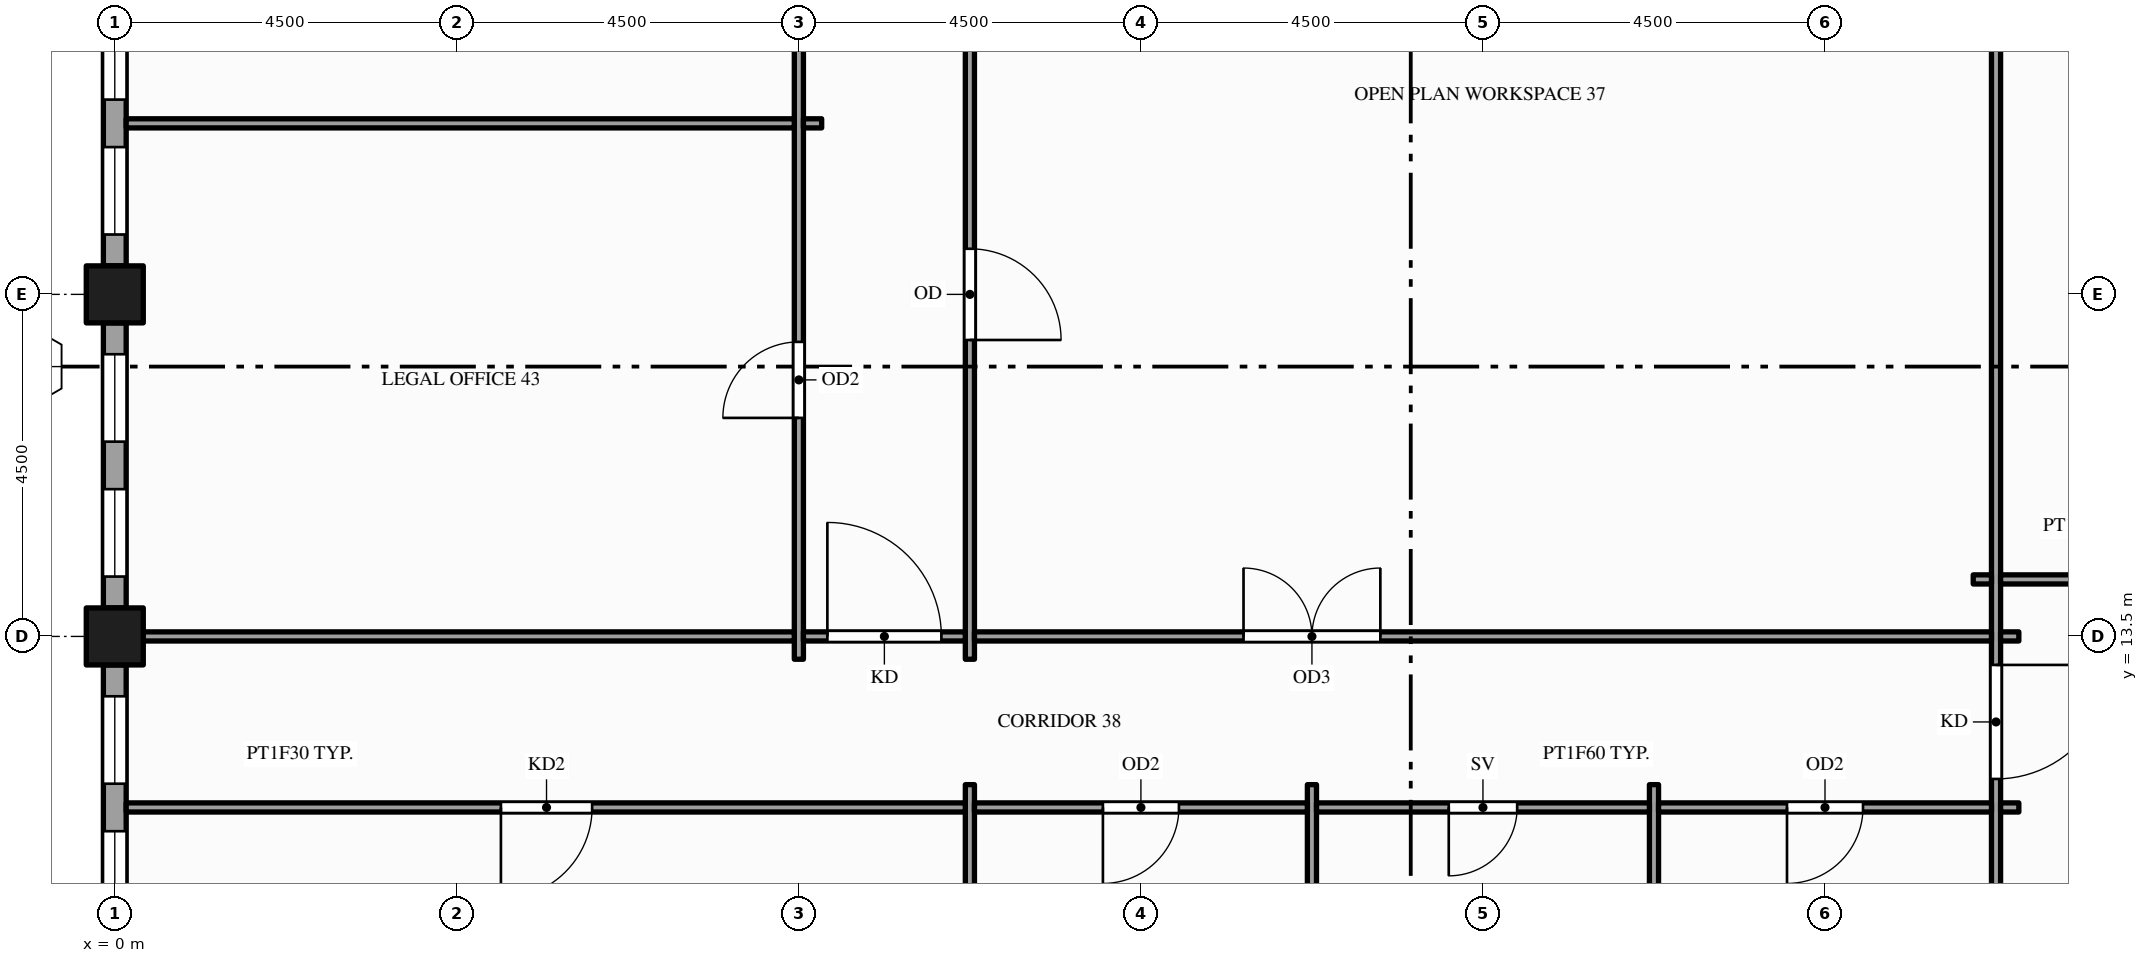
"""IFC4 building model, lengths in metres.
Left out: names, types, materials, properties, quantities, classifications, styles, units other than length and angle.
Written with IfcOpenShell. Run it as: python <this file> out.ifc"""

import sys

from ifc_helpers import new_model, si_unit, direction, frame, frame_2d, origin, origin_2d, place, context, subcontext, project, spatial, rectangle, hollow_rectangle, extrude, element, fill, save


model = new_model("IFC4")
c1 = context("Model", 3, precision=1e-05, world=origin(), true_north=direction((0.0, 1.0)))
c2 = subcontext(c1, "Body", "Model", "MODEL_VIEW")
j1 = project(units=[si_unit("LENGTHUNIT", "METRE"), si_unit("PLANEANGLEUNIT", "RADIAN")], contexts=[c1])
p1 = place(None, origin())
s1 = spatial("IfcSite", under=j1, at=p1, CompositionType="ELEMENT")
p2 = place(p1, origin())
s2 = spatial("IfcBuilding", under=s1, at=p2, CompositionType="ELEMENT")
p3 = place(p2, frame((0.0, 0.0, 235.0)))
s3 = spatial("IfcBuildingStorey", under=s2, at=p3, CompositionType="ELEMENT", Elevation=235.0)
for number, where, z_axis, x_axis in (
    (1, (0.0, 13.5, -0.15), (0.0, 0.0, 1.0), (1.0, 0.0, 0.0)),
    (2, (0.0, 18.0, -0.15), (0.0, 0.0, 1.0), (1.0, 0.0, 0.0)),
):
    element("IfcColumn", number, at=place(p3, frame(where, z_axis=z_axis, x_axis=x_axis)), inside=s3, PredefinedType="COLUMN", context=c2, shape_type="SweptSolid", body=[
        extrude(hollow_rectangle(XDim=0.75, YDim=0.75, WallThickness=0.036, at=origin_2d()), origin(), (0.0, 0.0, 1.0), 4.0),
    ])
p4 = place(p3, frame((0.0, 22.125, 0.0), z_axis=(0.0, 0.0, 1.0), x_axis=(0.0, -1.0, 0.0)))
e3 = element("IfcWall", 3, at=p4, inside=s3, PredefinedType="STANDARD", context=c2, shape_type="SweptSolid", body=[
    extrude(rectangle(XDim=3.75, YDim=0.3, at=frame_2d((1.875, 0.0))), origin(), (0.0, 0.0, 1.0), 3.157),
])
p5 = place(p4, frame((0.413, 0.0, 0.9)))
e4 = element("IfcOpeningElement", 4, at=p5, cuts=e3, PredefinedType="OPENING", context=c2, shape_type="SweptSolid", body=[
    extrude(rectangle(XDim=1.15, YDim=2.0, at=frame_2d((0.575, 1.0))), frame((0.0, 0.16, 0.0), z_axis=(0.0, -1.0, 0.0), x_axis=(1.0, 0.0, 0.0)), (0.0, 0.0, 1.0), 0.32),
])
p6 = place(p4, frame((2.188, 0.0, 0.9)))
e5 = element("IfcOpeningElement", 5, at=p6, cuts=e3, PredefinedType="OPENING", context=c2, shape_type="SweptSolid", body=[
    extrude(rectangle(XDim=1.15, YDim=2.0, at=frame_2d((0.575, 1.0))), frame((0.0, 0.16, 0.0), z_axis=(0.0, -1.0, 0.0), x_axis=(1.0, 0.0, 0.0)), (0.0, 0.0, 1.0), 0.32),
])
p7 = place(p3, frame((0.0, 17.625, 0.0), z_axis=(0.0, 0.0, 1.0), x_axis=(0.0, -1.0, 0.0)))
e6 = element("IfcWall", 6, at=p7, inside=s3, PredefinedType="STANDARD", context=c2, shape_type="SweptSolid", body=[
    extrude(rectangle(XDim=3.75, YDim=0.3, at=frame_2d((1.875, 0.0))), origin(), (0.0, 0.0, 1.0), 3.157),
])
p8 = place(p7, frame((0.413, 0.0, 0.9)))
e7 = element("IfcOpeningElement", 7, at=p8, cuts=e6, PredefinedType="OPENING", context=c2, shape_type="SweptSolid", body=[
    extrude(rectangle(XDim=1.15, YDim=2.0, at=frame_2d((0.575, 1.0))), frame((0.0, 0.16, 0.0), z_axis=(0.0, -1.0, 0.0), x_axis=(1.0, 0.0, 0.0)), (0.0, 0.0, 1.0), 0.32),
])
p9 = place(p7, frame((2.188, 0.0, 0.9)))
e8 = element("IfcOpeningElement", 8, at=p9, cuts=e6, PredefinedType="OPENING", context=c2, shape_type="SweptSolid", body=[
    extrude(rectangle(XDim=1.15, YDim=2.0, at=frame_2d((0.575, 1.0))), frame((0.0, 0.16, 0.0), z_axis=(0.0, -1.0, 0.0), x_axis=(1.0, 0.0, 0.0)), (0.0, 0.0, 1.0), 0.32),
])
p10 = place(p3, frame((0.0, 13.125, 0.0), z_axis=(0.0, 0.0, 1.0), x_axis=(0.0, -1.0, 0.0)))
e9 = element("IfcWall", 9, at=p10, inside=s3, PredefinedType="STANDARD", context=c2, shape_type="SweptSolid", body=[
    extrude(rectangle(XDim=3.75, YDim=0.3, at=frame_2d((1.875, 0.0))), origin(), (0.0, 0.0, 1.0), 3.157),
])
p11 = place(p10, frame((0.413, 0.0, 0.9)))
e10 = element("IfcOpeningElement", 10, at=p11, cuts=e9, PredefinedType="OPENING", context=c2, shape_type="SweptSolid", body=[
    extrude(rectangle(XDim=1.15, YDim=2.0, at=frame_2d((0.575, 1.0))), frame((0.0, 0.16, 0.0), z_axis=(0.0, -1.0, 0.0), x_axis=(1.0, 0.0, 0.0)), (0.0, 0.0, 1.0), 0.32),
])
p12 = place(p10, frame((2.188, 0.0, 0.9)))
e11 = element("IfcOpeningElement", 11, at=p12, cuts=e9, PredefinedType="OPENING", context=c2, shape_type="SweptSolid", body=[
    extrude(rectangle(XDim=1.15, YDim=2.0, at=frame_2d((0.575, 1.0))), frame((0.0, 0.16, 0.0), z_axis=(0.0, -1.0, 0.0), x_axis=(1.0, 0.0, 0.0)), (0.0, 0.0, 1.0), 0.32),
])
p13 = place(p3, frame((9.0, 13.2, 0.0), z_axis=(0.0, 0.0, 1.0), x_axis=(0.0, 1.0, 0.0)))
e12 = element("IfcWall", 12, at=p13, inside=s3, PredefinedType="PARTITIONING", context=c2, shape_type="SweptSolid", body=[
    extrude(rectangle(XDim=18.6, YDim=0.12, at=frame_2d((9.3, 0.0))), origin(), (0.0, 0.0, 1.0), 2.6),
])
p14 = place(p13, frame((3.175, 0.0, 0.0)))
e13 = element("IfcOpeningElement", 13, at=p14, cuts=e12, PredefinedType="OPENING", context=c2, shape_type="SweptSolid", body=[
    extrude(rectangle(XDim=1.0, YDim=2.1, at=frame_2d((0.5, 1.05))), frame((0.0, 0.07, 0.0), z_axis=(0.0, -1.0, 0.0), x_axis=(1.0, 0.0, 0.0)), (0.0, 0.0, 1.0), 0.14),
])
p15 = place(p13, frame((9.955, 0.0, 0.0)))
e14 = element("IfcOpeningElement", 14, at=p15, cuts=e12, PredefinedType="OPENING", context=c2, shape_type="SweptSolid", body=[
    extrude(rectangle(XDim=1.0, YDim=2.1, at=frame_2d((0.5, 1.05))), frame((0.0, 0.07, 0.0), z_axis=(0.0, -1.0, 0.0), x_axis=(1.0, 0.0, 0.0)), (0.0, 0.0, 1.0), 0.14),
])
p16 = place(p3, frame((11.25, 0.15, 0.0), z_axis=(0.0, 0.0, 1.0), x_axis=(0.0, 1.0, 0.0)))
e15 = element("IfcWall", 15, at=p16, inside=s3, PredefinedType="PARTITIONING", context=c2, shape_type="SweptSolid", body=[
    extrude(rectangle(XDim=11.4, YDim=0.12, at=frame_2d((5.7, 0.0))), origin(), (0.0, 0.0, 1.0), 2.87),
])
p17 = place(p3, frame((11.25, 13.2, 0.0), z_axis=(0.0, 0.0, 1.0), x_axis=(0.0, 1.0, 0.0)))
e16 = element("IfcWall", 16, at=p17, inside=s3, PredefinedType="PARTITIONING", context=c2, shape_type="SweptSolid", body=[
    extrude(rectangle(XDim=18.6, YDim=0.12, at=frame_2d((9.3, 0.0))), origin(), (0.0, 0.0, 1.0), 2.6),
])
p18 = place(p17, frame((4.2, 0.0, 0.0)))
e17 = element("IfcOpeningElement", 17, at=p18, cuts=e16, PredefinedType="OPENING", context=c2, shape_type="SweptSolid", body=[
    extrude(rectangle(XDim=1.2, YDim=2.1, at=frame_2d((0.6, 1.05))), frame((0.0, 0.07, 0.0), z_axis=(0.0, -1.0, 0.0), x_axis=(1.0, 0.0, 0.0)), (0.0, 0.0, 1.0), 0.14),
])
for number, where, z_axis, x_axis in (
    (18, (15.75, 0.15, 0.0), (0.0, 0.0, 1.0), (0.0, 1.0, 0.0)),
    (19, (20.25, 0.15, 0.0), (0.0, 0.0, 1.0), (0.0, 1.0, 0.0)),
):
    element("IfcWall", number, at=place(p3, frame(where, z_axis=z_axis, x_axis=x_axis)), inside=s3, PredefinedType="PARTITIONING", context=c2, shape_type="SweptSolid", body=[
        extrude(rectangle(XDim=11.4, YDim=0.12, at=frame_2d((5.7, 0.0))), origin(), (0.0, 0.0, 1.0), 2.87),
    ])
p19 = place(p3, frame((24.75, -1.35, 0.0), z_axis=(0.0, 0.0, 1.0), x_axis=(0.0, 1.0, 0.0)))
e20 = element("IfcWall", 20, at=p19, inside=s3, PredefinedType="PARTITIONING", context=c2, shape_type="SweptSolid", body=[
    extrude(rectangle(XDim=24.101, YDim=0.12, at=frame_2d((12.05, 0.0))), origin(), (0.0, 0.0, 1.0), 2.76),
])
p20 = place(p19, frame((12.975, 0.0, 0.0)))
e21 = element("IfcOpeningElement", 21, at=p20, cuts=e20, PredefinedType="OPENING", context=c2, shape_type="SweptSolid", body=[
    extrude(rectangle(XDim=1.5, YDim=2.1, at=frame_2d((0.75, 1.05))), frame((0.0, 0.07, 0.0), z_axis=(0.0, -1.0, 0.0), x_axis=(1.0, 0.0, 0.0)), (0.0, 0.0, 1.0), 0.14),
])
p21 = place(p3, frame((0.15, 11.25, 0.0), z_axis=(0.0, 0.0, 1.0), x_axis=(1.0, 0.0, 0.0)))
e22 = element("IfcWall", 22, at=p21, inside=s3, PredefinedType="PARTITIONING", context=c2, shape_type="SweptSolid", body=[
    extrude(rectangle(XDim=11.04, YDim=0.12, at=frame_2d((5.52, 0.0))), origin(), (0.0, 0.0, 1.0), 2.87),
])
p22 = place(p21, frame((4.93, 0.0, 0.0)))
e23 = element("IfcOpeningElement", 23, at=p22, cuts=e22, PredefinedType="OPENING", context=c2, shape_type="SweptSolid", body=[
    extrude(rectangle(XDim=1.2, YDim=2.1, at=frame_2d((0.6, 1.05))), frame((0.0, 0.07, 0.0), z_axis=(0.0, -1.0, 0.0), x_axis=(1.0, 0.0, 0.0)), (0.0, 0.0, 1.0), 0.14),
])
p23 = place(p3, frame((11.31, 11.25, 0.0), z_axis=(0.0, 0.0, 1.0), x_axis=(1.0, 0.0, 0.0)))
e24 = element("IfcWall", 24, at=p23, inside=s3, PredefinedType="PARTITIONING", context=c2, shape_type="SweptSolid", body=[
    extrude(rectangle(XDim=4.38, YDim=0.12, at=frame_2d((2.19, 0.0))), origin(), (0.0, 0.0, 1.0), 2.87),
])
p24 = place(p23, frame((1.69, 0.0, 0.0)))
e25 = element("IfcOpeningElement", 25, at=p24, cuts=e24, PredefinedType="OPENING", context=c2, shape_type="SweptSolid", body=[
    extrude(rectangle(XDim=1.0, YDim=2.1, at=frame_2d((0.5, 1.05))), frame((0.0, 0.07, 0.0), z_axis=(0.0, -1.0, 0.0), x_axis=(1.0, 0.0, 0.0)), (0.0, 0.0, 1.0), 0.14),
])
p25 = place(p3, frame((15.81, 11.25, 0.0), z_axis=(0.0, 0.0, 1.0), x_axis=(1.0, 0.0, 0.0)))
e26 = element("IfcWall", 26, at=p25, inside=s3, PredefinedType="PARTITIONING", context=c2, shape_type="SweptSolid", body=[
    extrude(rectangle(XDim=4.38, YDim=0.12, at=frame_2d((2.19, 0.0))), origin(), (0.0, 0.0, 1.0), 2.87),
])
p26 = place(p25, frame((1.74, 0.0, 0.0)))
e27 = element("IfcOpeningElement", 27, at=p26, cuts=e26, PredefinedType="OPENING", context=c2, shape_type="SweptSolid", body=[
    extrude(rectangle(XDim=0.9, YDim=2.1, at=frame_2d((0.45, 1.05))), frame((0.0, 0.07, 0.0), z_axis=(0.0, -1.0, 0.0), x_axis=(1.0, 0.0, 0.0)), (0.0, 0.0, 1.0), 0.14),
])
p27 = place(p3, frame((20.31, 11.25, 0.0), z_axis=(0.0, 0.0, 1.0), x_axis=(1.0, 0.0, 0.0)))
e28 = element("IfcWall", 28, at=p27, inside=s3, PredefinedType="PARTITIONING", context=c2, shape_type="SweptSolid", body=[
    extrude(rectangle(XDim=4.38, YDim=0.12, at=frame_2d((2.19, 0.0))), origin(), (0.0, 0.0, 1.0), 2.76),
])
p28 = place(p27, frame((1.69, 0.0, 0.0)))
e29 = element("IfcOpeningElement", 29, at=p28, cuts=e28, PredefinedType="OPENING", context=c2, shape_type="SweptSolid", body=[
    extrude(rectangle(XDim=1.0, YDim=2.1, at=frame_2d((0.5, 1.05))), frame((0.0, 0.07, 0.0), z_axis=(0.0, -1.0, 0.0), x_axis=(1.0, 0.0, 0.0)), (0.0, 0.0, 1.0), 0.14),
])
p29 = place(p3, frame((24.81, 11.25, 0.0), z_axis=(0.0, 0.0, 1.0), x_axis=(1.0, 0.0, 0.0)))
e30 = element("IfcWall", 30, at=p29, inside=s3, PredefinedType="PARTITIONING", context=c2, shape_type="SweptSolid", body=[
    extrude(rectangle(XDim=0.24, YDim=0.12, at=frame_2d((0.12, 0.0))), origin(), (0.0, 0.0, 1.0), 2.76),
])
p30 = place(p3, frame((0.15, 13.5, 0.0), z_axis=(0.0, 0.0, 1.0), x_axis=(1.0, 0.0, 0.0)))
e31 = element("IfcWall", 31, at=p30, inside=s3, PredefinedType="PARTITIONING", context=c2, shape_type="SweptSolid", body=[
    extrude(rectangle(XDim=8.79, YDim=0.12, at=frame_2d((4.395, 0.0))), origin(), (0.0, 0.0, 1.0), 2.87),
])
p31 = place(p3, frame((9.06, 13.5, 0.0), z_axis=(0.0, 0.0, 1.0), x_axis=(1.0, 0.0, 0.0)))
e32 = element("IfcWall", 32, at=p31, inside=s3, PredefinedType="PARTITIONING", context=c2, shape_type="SweptSolid", body=[
    extrude(rectangle(XDim=2.13, YDim=0.12, at=frame_2d((1.065, 0.0))), origin(), (0.0, 0.0, 1.0), 2.87),
])
p32 = place(p31, frame((0.315, 0.0, 0.0)))
e33 = element("IfcOpeningElement", 33, at=p32, cuts=e32, PredefinedType="OPENING", context=c2, shape_type="SweptSolid", body=[
    extrude(rectangle(XDim=1.5, YDim=2.1, at=frame_2d((0.75, 1.05))), frame((0.0, 0.07, 0.0), z_axis=(0.0, -1.0, 0.0), x_axis=(1.0, 0.0, 0.0)), (0.0, 0.0, 1.0), 0.14),
])
p33 = place(p3, frame((11.31, 13.5, 0.0), z_axis=(0.0, 0.0, 1.0), x_axis=(1.0, 0.0, 0.0)))
e34 = element("IfcWall", 34, at=p33, inside=s3, PredefinedType="PARTITIONING", context=c2, shape_type="SweptSolid", body=[
    extrude(rectangle(XDim=13.38, YDim=0.12, at=frame_2d((6.69, 0.0))), origin(), (0.0, 0.0, 1.0), 2.76),
])
p34 = place(p33, frame((3.54, 0.0, 0.0)))
e35 = element("IfcOpeningElement", 35, at=p34, cuts=e34, PredefinedType="OPENING", context=c2, shape_type="SweptSolid", body=[
    extrude(rectangle(XDim=1.8, YDim=2.1, at=frame_2d((0.9, 1.05))), frame((0.0, 0.07, 0.0), z_axis=(0.0, -1.0, 0.0), x_axis=(1.0, 0.0, 0.0)), (0.0, 0.0, 1.0), 0.14),
])
for number, where, z_axis, x_axis in (
    (36, (24.81, 13.5, 0.0), (0.0, 0.0, 1.0), (1.0, 0.0, 0.0)),
    (37, (24.45, 14.25, 0.0), (0.0, 0.0, 1.0), (1.0, 0.0, 0.0)),
):
    element("IfcWall", number, at=place(p3, frame(where, z_axis=z_axis, x_axis=x_axis)), inside=s3, PredefinedType="PARTITIONING", context=c2, shape_type="SweptSolid", body=[
        extrude(rectangle(XDim=0.24, YDim=0.12, at=frame_2d((0.12, 0.0))), origin(), (0.0, 0.0, 1.0), 2.76),
    ])
p35 = place(p3, frame((24.81, 14.25, 0.0), z_axis=(0.0, 0.0, 1.0), x_axis=(1.0, 0.0, 0.0)))
e38 = element("IfcWall", 38, at=p35, inside=s3, PredefinedType="PARTITIONING", context=c2, shape_type="SweptSolid", body=[
    extrude(rectangle(XDim=2.13, YDim=0.12, at=frame_2d((1.065, 0.0))), origin(), (0.0, 0.0, 1.0), 2.76),
])
p36 = place(p3, frame((0.15, 20.25, 0.0), z_axis=(0.0, 0.0, 1.0), x_axis=(1.0, 0.0, 0.0)))
e39 = element("IfcWall", 39, at=p36, inside=s3, PredefinedType="PARTITIONING", context=c2, shape_type="SweptSolid", body=[
    extrude(rectangle(XDim=8.79, YDim=0.12, at=frame_2d((4.395, 0.0))), origin(), (0.0, 0.0, 1.0), 2.87),
])
p37 = place(p3, frame((9.06, 20.25, 0.0), z_axis=(0.0, 0.0, 1.0), x_axis=(1.0, 0.0, 0.0)))
e40 = element("IfcWall", 40, at=p37, inside=s3, PredefinedType="PARTITIONING", context=c2, shape_type="SweptSolid", body=[
    extrude(rectangle(XDim=0.24, YDim=0.12, at=frame_2d((0.12, 0.0))), origin(), (0.0, 0.0, 1.0), 2.87),
])
p38 = place(p5, origin())
e41 = element("IfcWindow", 41, at=p38, inside=s3, PartitioningType="SINGLE_PANEL", PredefinedType="WINDOW", context=c2, shape_type="SweptSolid", body=[
    extrude(rectangle(XDim=1.15, YDim=2.0, at=frame_2d((0.575, 1.0))), frame((0.0, 0.03, 0.0), z_axis=(0.0, -1.0, 0.0), x_axis=(1.0, 0.0, 0.0)), (0.0, 0.0, 1.0), 0.06),
])
fill(e4, e41)
p39 = place(p6, origin())
e42 = element("IfcWindow", 42, at=p39, inside=s3, PartitioningType="SINGLE_PANEL", PredefinedType="WINDOW", context=c2, shape_type="SweptSolid", body=[
    extrude(rectangle(XDim=1.15, YDim=2.0, at=frame_2d((0.575, 1.0))), frame((0.0, 0.03, 0.0), z_axis=(0.0, -1.0, 0.0), x_axis=(1.0, 0.0, 0.0)), (0.0, 0.0, 1.0), 0.06),
])
fill(e5, e42)
p40 = place(p8, origin())
e43 = element("IfcWindow", 43, at=p40, inside=s3, PartitioningType="SINGLE_PANEL", PredefinedType="WINDOW", context=c2, shape_type="SweptSolid", body=[
    extrude(rectangle(XDim=1.15, YDim=2.0, at=frame_2d((0.575, 1.0))), frame((0.0, 0.03, 0.0), z_axis=(0.0, -1.0, 0.0), x_axis=(1.0, 0.0, 0.0)), (0.0, 0.0, 1.0), 0.06),
])
fill(e7, e43)
p41 = place(p9, origin())
e44 = element("IfcWindow", 44, at=p41, inside=s3, PartitioningType="SINGLE_PANEL", PredefinedType="WINDOW", context=c2, shape_type="SweptSolid", body=[
    extrude(rectangle(XDim=1.15, YDim=2.0, at=frame_2d((0.575, 1.0))), frame((0.0, 0.03, 0.0), z_axis=(0.0, -1.0, 0.0), x_axis=(1.0, 0.0, 0.0)), (0.0, 0.0, 1.0), 0.06),
])
fill(e8, e44)
p42 = place(p11, origin())
e45 = element("IfcWindow", 45, at=p42, inside=s3, PartitioningType="SINGLE_PANEL", PredefinedType="WINDOW", context=c2, shape_type="SweptSolid", body=[
    extrude(rectangle(XDim=1.15, YDim=2.0, at=frame_2d((0.575, 1.0))), frame((0.0, 0.03, 0.0), z_axis=(0.0, -1.0, 0.0), x_axis=(1.0, 0.0, 0.0)), (0.0, 0.0, 1.0), 0.06),
])
fill(e10, e45)
p43 = place(p12, origin())
e46 = element("IfcWindow", 46, at=p43, inside=s3, PartitioningType="SINGLE_PANEL", PredefinedType="WINDOW", context=c2, shape_type="SweptSolid", body=[
    extrude(rectangle(XDim=1.15, YDim=2.0, at=frame_2d((0.575, 1.0))), frame((0.0, 0.03, 0.0), z_axis=(0.0, -1.0, 0.0), x_axis=(1.0, 0.0, 0.0)), (0.0, 0.0, 1.0), 0.06),
])
fill(e11, e46)
p44 = place(p20, origin())
e47 = element("IfcDoor", 47, at=p44, inside=s3, OperationType="SINGLE_SWING_RIGHT", PredefinedType="DOOR", context=c2, shape_type="SweptSolid", body=[
    extrude(rectangle(XDim=1.5, YDim=2.1, at=frame_2d((0.75, 1.05))), frame((0.0, 0.025, 0.0), z_axis=(0.0, -1.0, 0.0), x_axis=(1.0, 0.0, 0.0)), (0.0, 0.0, 1.0), 0.05),
])
fill(e21, e47)
p45 = place(p22, origin())
e48 = element("IfcDoor", 48, at=p45, inside=s3, OperationType="SINGLE_SWING_LEFT", PredefinedType="DOOR", context=c2, shape_type="SweptSolid", body=[
    extrude(rectangle(XDim=1.2, YDim=2.1, at=frame_2d((0.6, 1.05))), frame((0.0, 0.025, 0.0), z_axis=(0.0, -1.0, 0.0), x_axis=(1.0, 0.0, 0.0)), (0.0, 0.0, 1.0), 0.05),
])
fill(e23, e48)
p46 = place(p24, origin())
e49 = element("IfcDoor", 49, at=p46, inside=s3, OperationType="SINGLE_SWING_LEFT", PredefinedType="DOOR", context=c2, shape_type="SweptSolid", body=[
    extrude(rectangle(XDim=1.0, YDim=2.1, at=frame_2d((0.5, 1.05))), frame((0.0, 0.025, 0.0), z_axis=(0.0, -1.0, 0.0), x_axis=(1.0, 0.0, 0.0)), (0.0, 0.0, 1.0), 0.05),
])
fill(e25, e49)
p47 = place(p26, origin())
e50 = element("IfcDoor", 50, at=p47, inside=s3, OperationType="SINGLE_SWING_LEFT", PredefinedType="DOOR", context=c2, shape_type="SweptSolid", body=[
    extrude(rectangle(XDim=0.9, YDim=2.1, at=frame_2d((0.45, 1.05))), frame((0.0, 0.025, 0.0), z_axis=(0.0, -1.0, 0.0), x_axis=(1.0, 0.0, 0.0)), (0.0, 0.0, 1.0), 0.05),
])
fill(e27, e50)
p48 = place(p28, origin())
e51 = element("IfcDoor", 51, at=p48, inside=s3, OperationType="SINGLE_SWING_LEFT", PredefinedType="DOOR", context=c2, shape_type="SweptSolid", body=[
    extrude(rectangle(XDim=1.0, YDim=2.1, at=frame_2d((0.5, 1.05))), frame((0.0, 0.025, 0.0), z_axis=(0.0, -1.0, 0.0), x_axis=(1.0, 0.0, 0.0)), (0.0, 0.0, 1.0), 0.05),
])
fill(e29, e51)
p49 = place(p34, origin())
e52 = element("IfcDoor", 52, at=p49, inside=s3, OperationType="DOUBLE_DOOR_SINGLE_SWING", PredefinedType="DOOR", context=c2, shape_type="SweptSolid", body=[
    extrude(rectangle(XDim=1.8, YDim=2.1, at=frame_2d((0.9, 1.05))), frame((0.0, 0.025, 0.0), z_axis=(0.0, -1.0, 0.0), x_axis=(1.0, 0.0, 0.0)), (0.0, 0.0, 1.0), 0.05),
])
fill(e35, e52)
p50 = place(p32, origin())
e53 = element("IfcDoor", 53, at=p50, inside=s3, OperationType="SINGLE_SWING_LEFT", PredefinedType="DOOR", context=c2, shape_type="SweptSolid", body=[
    extrude(rectangle(XDim=1.5, YDim=2.1, at=frame_2d((0.75, 1.05))), frame((0.0, 0.025, 0.0), z_axis=(0.0, -1.0, 0.0), x_axis=(1.0, 0.0, 0.0)), (0.0, 0.0, 1.0), 0.05),
])
fill(e33, e53)
p51 = place(p14, origin())
e54 = element("IfcDoor", 54, at=p51, inside=s3, OperationType="SINGLE_SWING_LEFT", PredefinedType="DOOR", context=c2, shape_type="SweptSolid", body=[
    extrude(rectangle(XDim=1.0, YDim=2.1, at=frame_2d((0.5, 1.05))), frame((0.0, 0.025, 0.0), z_axis=(0.0, -1.0, 0.0), x_axis=(1.0, 0.0, 0.0)), (0.0, 0.0, 1.0), 0.05),
])
fill(e13, e54)
p52 = place(p18, origin())
e55 = element("IfcDoor", 55, at=p52, inside=s3, OperationType="SINGLE_SWING_LEFT", PredefinedType="DOOR", context=c2, shape_type="SweptSolid", body=[
    extrude(rectangle(XDim=1.2, YDim=2.1, at=frame_2d((0.6, 1.05))), frame((0.0, 0.025, 0.0), z_axis=(0.0, -1.0, 0.0), x_axis=(1.0, 0.0, 0.0)), (0.0, 0.0, 1.0), 0.05),
])
fill(e17, e55)
save(model, sys.argv[1])
